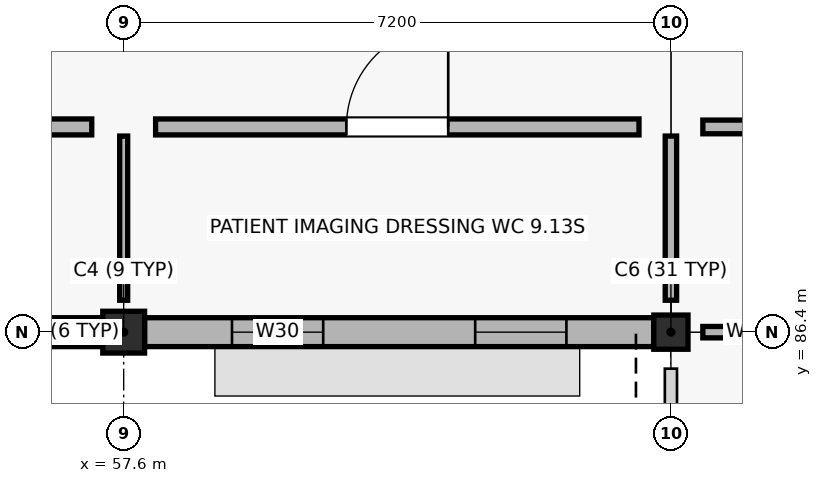
"""IFC4 building model, lengths in metres.
Left out: names, types, materials, properties, quantities, classifications, styles, units other than length and angle.
Written with IfcOpenShell. Run it as: python <this file> out.ifc"""

import sys

from ifc_helpers import new_model, si_unit, direction, frame, frame_2d, origin, origin_2d, place, context, subcontext, project, spatial, rectangle, extrude, element, fill, save


model = new_model("IFC4")
c1 = context("Model", 3, precision=1e-05, world=origin(), true_north=direction((0.0, 1.0)))
c2 = subcontext(c1, "Body", "Model", "MODEL_VIEW")
j1 = project(units=[si_unit("LENGTHUNIT", "METRE"), si_unit("PLANEANGLEUNIT", "RADIAN")], contexts=[c1])
p1 = place(None, origin())
s1 = spatial("IfcSite", under=j1, at=p1, CompositionType="ELEMENT")
p2 = place(p1, origin())
s2 = spatial("IfcBuilding", under=s1, at=p2, CompositionType="ELEMENT")
p3 = place(p2, frame((0.0, 0.0, 4.5)))
s3 = spatial("IfcBuildingStorey", under=s2, at=p3, CompositionType="ELEMENT", Elevation=4.5)
p4 = place(p3, frame((57.6, 86.4, 0.0), z_axis=(0.0, 0.0, 1.0), x_axis=(1.0, 0.0, 0.0)))
e1 = element("IfcColumn", 1, at=p4, inside=s3, PredefinedType="COLUMN", context=c2, shape_type="SweptSolid", body=[
    extrude(rectangle(XDim=0.55, YDim=0.55, at=origin_2d()), origin(), (0.0, 0.0, 1.0), 4.5),
])
p5 = place(p3, frame((64.8, 86.4, 0.0), z_axis=(0.0, 0.0, 1.0), x_axis=(1.0, 0.0, 0.0)))
e2 = element("IfcColumn", 2, at=p5, inside=s3, PredefinedType="COLUMN", context=c2, shape_type="SweptSolid", body=[
    extrude(rectangle(XDim=0.45, YDim=0.45, at=origin_2d()), origin(), (0.0, 0.0, 1.0), 12.72),
])
p6 = place(p3, frame((50.675, 86.4, 0.0), z_axis=(0.0, 0.0, 1.0), x_axis=(1.0, 0.0, 0.0)))
e3 = element("IfcWall", 3, at=p6, inside=s3, PredefinedType="SOLIDWALL", context=c2, shape_type="SweptSolid", body=[
    extrude(rectangle(XDim=6.65, YDim=0.38, at=frame_2d((3.325, 0.0))), origin(), (0.0, 0.0, 1.0), 3.47),
])
p7 = place(p6, frame((1.0, 0.0, 0.9)))
e4 = element("IfcOpeningElement", 4, at=p7, cuts=e3, PredefinedType="OPENING", context=c2, shape_type="SweptSolid", body=[
    extrude(rectangle(XDim=1.5, YDim=1.5, at=frame_2d((0.75, 0.75))), frame((0.0, 0.2, 0.0), z_axis=(0.0, -1.0, 0.0), x_axis=(1.0, 0.0, 0.0)), (0.0, 0.0, 1.0), 0.4),
])
p8 = place(p6, frame((4.15, 0.0, 0.9)))
e5 = element("IfcOpeningElement", 5, at=p8, cuts=e3, PredefinedType="OPENING", context=c2, shape_type="SweptSolid", body=[
    extrude(rectangle(XDim=1.5, YDim=1.5, at=frame_2d((0.75, 0.75))), frame((0.0, 0.2, 0.0), z_axis=(0.0, -1.0, 0.0), x_axis=(1.0, 0.0, 0.0)), (0.0, 0.0, 1.0), 0.4),
])
p9 = place(p3, frame((57.875, 86.4, 0.0), z_axis=(0.0, 0.0, 1.0), x_axis=(1.0, 0.0, 0.0)))
e6 = element("IfcWall", 6, at=p9, inside=s3, PredefinedType="SOLIDWALL", context=c2, shape_type="SweptSolid", body=[
    extrude(rectangle(XDim=6.7, YDim=0.38, at=frame_2d((3.35, 0.0))), origin(), (0.0, 0.0, 1.0), 3.47),
])
p10 = place(p9, frame((1.15, 0.0, 0.9)))
e7 = element("IfcOpeningElement", 7, at=p10, cuts=e6, PredefinedType="OPENING", context=c2, shape_type="SweptSolid", body=[
    extrude(rectangle(XDim=1.2, YDim=1.62, at=frame_2d((0.6, 0.81))), frame((0.0, 0.2, 0.0), z_axis=(0.0, -1.0, 0.0), x_axis=(1.0, 0.0, 0.0)), (0.0, 0.0, 1.0), 0.4),
])
p11 = place(p9, frame((4.35, 0.0, 0.9)))
e8 = element("IfcOpeningElement", 8, at=p11, cuts=e6, PredefinedType="OPENING", context=c2, shape_type="SweptSolid", body=[
    extrude(rectangle(XDim=1.2, YDim=1.62, at=frame_2d((0.6, 0.81))), frame((0.0, 0.2, 0.0), z_axis=(0.0, -1.0, 0.0), x_axis=(1.0, 0.0, 0.0)), (0.0, 0.0, 1.0), 0.4),
])
p12 = place(p3, frame((65.22, 86.4, 0.0), z_axis=(0.0, 0.0, 1.0), x_axis=(1.0, 0.0, 0.0)))
e9 = element("IfcWall", 9, at=p12, inside=s3, PredefinedType="PARTITIONING", context=c2, shape_type="SweptSolid", body=[
    extrude(rectangle(XDim=2.16, YDim=0.15, at=frame_2d((1.08, 0.0))), origin(), (0.0, 0.0, 1.0), 3.36),
])
p13 = place(p3, frame((65.22, 89.1, 0.0), z_axis=(0.0, 0.0, 1.0), x_axis=(1.0, 0.0, 0.0)))
e10 = element("IfcWall", 10, at=p13, inside=s3, PredefinedType="PARTITIONING", context=c2, shape_type="SweptSolid", body=[
    extrude(rectangle(XDim=6.36, YDim=0.18, at=frame_2d((3.18, 0.0))), origin(), (0.0, 0.0, 1.0), 3.36),
])
p14 = place(p13, frame((2.65, 0.0, 0.0)))
e11 = element("IfcOpeningElement", 11, at=p14, cuts=e10, PredefinedType="OPENING", context=c2, shape_type="SweptSolid", body=[
    extrude(rectangle(XDim=1.06, YDim=2.14, at=frame_2d((0.53, 1.07))), frame((0.0, 0.1, 0.0), z_axis=(0.0, -1.0, 0.0), x_axis=(1.0, 0.0, 0.0)), (0.0, 0.0, 1.0), 0.2),
])
p15 = place(p3, frame((50.82, 89.1, 0.0), z_axis=(0.0, 0.0, 1.0), x_axis=(1.0, 0.0, 0.0)))
e12 = element("IfcWall", 12, at=p15, inside=s3, PredefinedType="PLUMBINGWALL", context=c2, shape_type="SweptSolid", body=[
    extrude(rectangle(XDim=6.36, YDim=0.21, at=frame_2d((3.18, 0.0))), origin(), (0.0, 0.0, 1.0), 3.36),
])
p16 = place(p15, frame((2.67, 0.0, 0.0)))
e13 = element("IfcOpeningElement", 13, at=p16, cuts=e12, PredefinedType="OPENING", context=c2, shape_type="SweptSolid", body=[
    extrude(rectangle(XDim=1.02, YDim=2.04, at=frame_2d((0.51, 1.02))), frame((0.0, 0.115, 0.0), z_axis=(0.0, -1.0, 0.0), x_axis=(1.0, 0.0, 0.0)), (0.0, 0.0, 1.0), 0.23),
])
p17 = place(p3, frame((57.6, 86.82, 0.0), z_axis=(0.0, 0.0, 1.0), x_axis=(0.0, 1.0, 0.0)))
e14 = element("IfcWall", 14, at=p17, inside=s3, PredefinedType="PARTITIONING", context=c2, shape_type="SweptSolid", body=[
    extrude(rectangle(XDim=2.16, YDim=0.105, at=frame_2d((1.08, 0.0))), origin(), (0.0, 0.0, 1.0), 3.36),
])
p18 = place(p3, frame((58.02, 89.1, 0.0), z_axis=(0.0, 0.0, 1.0), x_axis=(1.0, 0.0, 0.0)))
e15 = element("IfcWall", 15, at=p18, inside=s3, PredefinedType="PLUMBINGWALL", context=c2, shape_type="SweptSolid", body=[
    extrude(rectangle(XDim=6.36, YDim=0.21, at=frame_2d((3.18, 0.0))), origin(), (0.0, 0.0, 1.0), 3.36),
])
p19 = place(p18, frame((2.51, 0.0, 0.0)))
e16 = element("IfcOpeningElement", 16, at=p19, cuts=e15, PredefinedType="OPENING", context=c2, shape_type="SweptSolid", body=[
    extrude(rectangle(XDim=1.34, YDim=2.04, at=frame_2d((0.67, 1.02))), frame((0.0, 0.115, 0.0), z_axis=(0.0, -1.0, 0.0), x_axis=(1.0, 0.0, 0.0)), (0.0, 0.0, 1.0), 0.23),
])
p20 = place(p3, frame((64.8, 86.82, 0.0), z_axis=(0.0, 0.0, 1.0), x_axis=(0.0, 1.0, 0.0)))
e17 = element("IfcWall", 17, at=p20, inside=s3, PredefinedType="PARTITIONING", context=c2, shape_type="SweptSolid", body=[
    extrude(rectangle(XDim=2.16, YDim=0.15, at=frame_2d((1.08, 0.0))), origin(), (0.0, 0.0, 1.0), 3.36),
])
p21 = place(p10, origin())
e18 = element("IfcWindow", 18, at=p21, inside=s3, PartitioningType="SINGLE_PANEL", PredefinedType="WINDOW", context=c2, shape_type="SweptSolid", body=[
    extrude(rectangle(XDim=1.2, YDim=1.62, at=frame_2d((0.6, 0.81))), frame((0.0, 0.03, 0.0), z_axis=(0.0, -1.0, 0.0), x_axis=(1.0, 0.0, 0.0)), (0.0, 0.0, 1.0), 0.06),
])
fill(e7, e18)
p22 = place(p11, origin())
e19 = element("IfcWindow", 19, at=p22, inside=s3, PartitioningType="SINGLE_PANEL", PredefinedType="WINDOW", context=c2, shape_type="SweptSolid", body=[
    extrude(rectangle(XDim=1.2, YDim=1.62, at=frame_2d((0.6, 0.81))), frame((0.0, 0.03, 0.0), z_axis=(0.0, -1.0, 0.0), x_axis=(1.0, 0.0, 0.0)), (0.0, 0.0, 1.0), 0.06),
])
fill(e8, e19)
p23 = place(p19, origin())
e20 = element("IfcDoor", 20, at=p23, inside=s3, OperationType="SINGLE_SWING_RIGHT", PredefinedType="DOOR", context=c2, shape_type="SweptSolid", body=[
    extrude(rectangle(XDim=1.34, YDim=2.04, at=frame_2d((0.67, 1.02))), frame((0.0, 0.025, 0.0), z_axis=(0.0, -1.0, 0.0), x_axis=(1.0, 0.0, 0.0)), (0.0, 0.0, 1.0), 0.05),
])
fill(e16, e20)
save(model, sys.argv[1])
